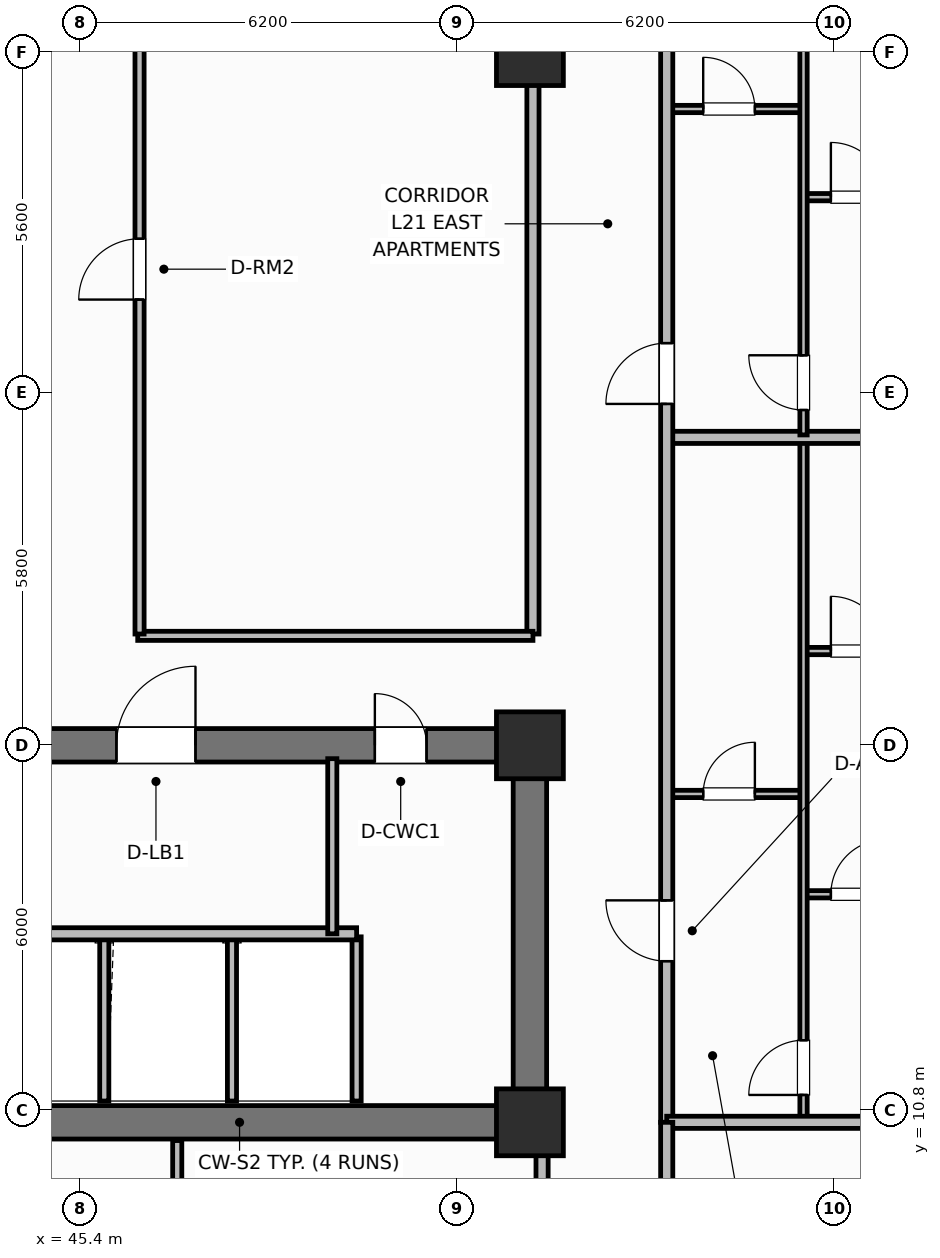
"""IFC4 building model, lengths in metres.
Left out: names, types, materials, properties, quantities, classifications, styles, units other than length and angle.
Written with IfcOpenShell. Run it as: python <this file> out.ifc"""

import sys

from ifc_helpers import new_model, si_unit, direction, frame, frame_2d, origin, origin_2d, place, context, subcontext, project, spatial, rectangle, extrude, element, fill, save


model = new_model("IFC4")
c1 = context("Model", 3, precision=1e-05, world=origin(), true_north=direction((0.0, 1.0)))
c2 = subcontext(c1, "Body", "Model", "MODEL_VIEW")
j1 = project(units=[si_unit("LENGTHUNIT", "METRE"), si_unit("PLANEANGLEUNIT", "RADIAN")], contexts=[c1])
p1 = place(None, origin())
s1 = spatial("IfcSite", under=j1, at=p1, CompositionType="ELEMENT")
p2 = place(p1, origin())
s2 = spatial("IfcBuilding", under=s1, at=p2, CompositionType="ELEMENT")
p3 = place(p2, frame((0.0, 0.0, 88.3)))
s3 = spatial("IfcBuildingStorey", under=s2, at=p3, CompositionType="ELEMENT", Elevation=88.3)
p4 = place(p3, frame((52.8, 10.6, 0.0), z_axis=(0.0, 0.0, 1.0), x_axis=(-1.0, 0.0, 0.0)))
e1 = element("IfcWall", 1, at=p4, inside=s3, PredefinedType="SHEAR", context=c2, shape_type="SweptSolid", body=[
    extrude(rectangle(XDim=27.2, YDim=0.55, at=frame_2d((13.6, 0.0))), origin(), (0.0, 0.0, 1.0), 3.7),
])
p5 = place(p3, frame((52.8, 10.875, 0.0), z_axis=(0.0, 0.0, 1.0), x_axis=(0.0, 1.0, 0.0)))
e2 = element("IfcWall", 2, at=p5, inside=s3, PredefinedType="SHEAR", context=c2, shape_type="SweptSolid", body=[
    extrude(rectangle(XDim=5.65, YDim=0.55, at=frame_2d((2.825, 0.0))), origin(), (0.0, 0.0, 1.0), 3.7),
])
p6 = place(p3, frame((25.6, 16.8, 0.0), z_axis=(0.0, 0.0, 1.0), x_axis=(1.0, 0.0, 0.0)))
e3 = element("IfcWall", 3, at=p6, inside=s3, PredefinedType="SHEAR", context=c2, shape_type="SweptSolid", body=[
    extrude(rectangle(XDim=27.2, YDim=0.55, at=frame_2d((13.6, 0.0))), origin(), (0.0, 0.0, 1.0), 3.7),
])
p7 = place(p6, frame((1.9, 0.0, 0.0)))
e4 = element("IfcOpeningElement", 4, at=p7, cuts=e3, PredefinedType="OPENING", context=c2, shape_type="SweptSolid", body=[
    extrude(rectangle(XDim=1.1, YDim=2.15, at=frame_2d((0.55, 1.075))), frame((0.0, 0.285, 0.0), z_axis=(0.0, -1.0, 0.0), x_axis=(1.0, 0.0, 0.0)), (0.0, 0.0, 1.0), 0.57),
])
p8 = place(p6, frame((13.0, 0.0, 0.0)))
e5 = element("IfcOpeningElement", 5, at=p8, cuts=e3, PredefinedType="OPENING", context=c2, shape_type="SweptSolid", body=[
    extrude(rectangle(XDim=1.2, YDim=2.15, at=frame_2d((0.6, 1.075))), frame((0.0, 0.285, 0.0), z_axis=(0.0, -1.0, 0.0), x_axis=(1.0, 0.0, 0.0)), (0.0, 0.0, 1.0), 0.57),
])
p9 = place(p6, frame((20.4, 0.0, 0.0)))
e6 = element("IfcOpeningElement", 6, at=p9, cuts=e3, PredefinedType="OPENING", context=c2, shape_type="SweptSolid", body=[
    extrude(rectangle(XDim=1.3, YDim=2.2, at=frame_2d((0.65, 1.1))), frame((0.0, 0.285, 0.0), z_axis=(0.0, -1.0, 0.0), x_axis=(1.0, 0.0, 0.0)), (0.0, 0.0, 1.0), 0.57),
])
p10 = place(p6, frame((24.65, 0.0, 0.0)))
e7 = element("IfcOpeningElement", 7, at=p10, cuts=e3, PredefinedType="OPENING", context=c2, shape_type="SweptSolid", body=[
    extrude(rectangle(XDim=0.85, YDim=2.1, at=frame_2d((0.425, 1.05))), frame((0.0, 0.285, 0.0), z_axis=(0.0, -1.0, 0.0), x_axis=(1.0, 0.0, 0.0)), (0.0, 0.0, 1.0), 0.57),
])
for number, where, z_axis, x_axis in (
    (8, (52.8, 10.6, 0.0), (0.0, 0.0, 1.0), (1.0, 0.0, 0.0)),
    (9, (52.8, 16.8, 0.0), (0.0, 0.0, 1.0), (1.0, 0.0, 0.0)),
    (10, (52.8, 28.2, 0.0), (0.0, 0.0, 1.0), (1.0, 0.0, 0.0)),
):
    element("IfcColumn", number, at=place(p3, frame(where, z_axis=z_axis, x_axis=x_axis)), inside=s3, PredefinedType="COLUMN", context=c2, shape_type="SweptSolid", body=[
        extrude(rectangle(XDim=1.1, YDim=1.1, at=origin_2d()), origin(), (0.0, 0.0, 1.0), 3.7),
    ])
for number, where, z_axis, x_axis in (
    (11, (45.8, 10.95, 0.0), (0.0, 0.0, 1.0), (0.0, 1.0, 0.0)),
    (12, (47.9, 10.95, 0.0), (0.0, 0.0, 1.0), (0.0, 1.0, 0.0)),
    (13, (49.95, 10.95, 0.0), (0.0, 0.0, 1.0), (0.0, 1.0, 0.0)),
):
    element("IfcWall", number, at=place(p3, frame(where, z_axis=z_axis, x_axis=x_axis)), inside=s3, PredefinedType="PARTITIONING", context=c2, shape_type="SweptSolid", body=[
        extrude(rectangle(XDim=2.7, YDim=0.15, at=frame_2d((1.35, 0.0))), origin(), (0.0, 0.0, 1.0), 2.53),
    ])
p11 = place(p3, frame((43.55, 13.7, 0.0), z_axis=(0.0, 0.0, 1.0), x_axis=(1.0, 0.0, 0.0)))
e14 = element("IfcWall", 14, at=p11, inside=s3, PredefinedType="PARTITIONING", context=c2, shape_type="SweptSolid", body=[
    extrude(rectangle(XDim=6.4, YDim=0.2, at=frame_2d((3.2, 0.0))), origin(), (0.0, 0.0, 1.0), 2.53),
])
p12 = place(p3, frame((49.55, 13.7, 0.0), z_axis=(0.0, 0.0, 1.0), x_axis=(0.0, 1.0, 0.0)))
e15 = element("IfcWall", 15, at=p12, inside=s3, PredefinedType="PARTITIONING", context=c2, shape_type="SweptSolid", body=[
    extrude(rectangle(XDim=2.88, YDim=0.15, at=frame_2d((1.44, 0.0))), origin(), (0.0, 0.0, 1.0), 2.53),
])
p13 = place(p3, frame((52.85, 18.63, 0.0), z_axis=(0.0, 0.0, 1.0), x_axis=(0.0, 1.0, 0.0)))
e16 = element("IfcWall", 16, at=p13, inside=s3, PredefinedType="PARTITIONING", context=c2, shape_type="SweptSolid", body=[
    extrude(rectangle(XDim=19.14, YDim=0.2, at=frame_2d((9.57, 0.0))), origin(), (0.0, 0.0, 1.0), 2.53),
])
p14 = place(p3, frame((46.35, 18.6, 0.0), z_axis=(0.0, 0.0, 1.0), x_axis=(1.0, 0.0, 0.0)))
e17 = element("IfcWall", 17, at=p14, inside=s3, PredefinedType="PARTITIONING", context=c2, shape_type="SweptSolid", body=[
    extrude(rectangle(XDim=6.5, YDim=0.15, at=frame_2d((3.25, 0.0))), origin(), (0.0, 0.0, 1.0), 2.53),
])
p15 = place(p3, frame((46.38, 18.63, 0.0), z_axis=(0.0, 0.0, 1.0), x_axis=(0.0, 1.0, 0.0)))
e18 = element("IfcWall", 18, at=p15, inside=s3, PredefinedType="PARTITIONING", context=c2, shape_type="SweptSolid", body=[
    extrude(rectangle(XDim=19.14, YDim=0.15, at=frame_2d((9.57, 0.0))), origin(), (0.0, 0.0, 1.0), 2.53),
])
p16 = place(p15, frame((5.5, 0.0, 0.0)))
e19 = element("IfcOpeningElement", 19, at=p16, cuts=e18, PredefinedType="OPENING", context=c2, shape_type="SweptSolid", body=[
    extrude(rectangle(XDim=1.0, YDim=2.15, at=frame_2d((0.5, 1.075))), frame((0.0, 0.085, 0.0), z_axis=(0.0, -1.0, 0.0), x_axis=(1.0, 0.0, 0.0)), (0.0, 0.0, 1.0), 0.17),
])
p17 = place(p3, frame((55.05, 16.0, 0.0), z_axis=(0.0, 0.0, 1.0), x_axis=(1.0, 0.0, 0.0)))
e20 = element("IfcWall", 20, at=p17, inside=s3, PredefinedType="PARTITIONING", context=c2, shape_type="SweptSolid", body=[
    extrude(rectangle(XDim=2.25, YDim=0.12, at=frame_2d((1.125, 0.0))), origin(), (0.0, 0.0, 1.0), 2.53),
])
p18 = place(p17, frame((0.6, 0.0, 0.0)))
e21 = element("IfcOpeningElement", 21, at=p18, cuts=e20, PredefinedType="OPENING", context=c2, shape_type="SweptSolid", body=[
    extrude(rectangle(XDim=0.85, YDim=2.1, at=frame_2d((0.425, 1.05))), frame((0.0, 0.07, 0.0), z_axis=(0.0, -1.0, 0.0), x_axis=(1.0, 0.0, 0.0)), (0.0, 0.0, 1.0), 0.14),
])
p19 = place(p3, frame((57.3, 14.35, 0.0), z_axis=(0.0, 0.0, 1.0), x_axis=(1.0, 0.0, 0.0)))
e22 = element("IfcWall", 22, at=p19, inside=s3, PredefinedType="PARTITIONING", context=c2, shape_type="SweptSolid", body=[
    extrude(rectangle(XDim=6.53, YDim=0.12, at=frame_2d((3.265, 0.0))), origin(), (0.0, 0.0, 1.0), 2.53),
])
p20 = place(p19, frame((0.45, 0.0, 0.0)))
e23 = element("IfcOpeningElement", 23, at=p20, cuts=e22, PredefinedType="OPENING", context=c2, shape_type="SweptSolid", body=[
    extrude(rectangle(XDim=0.9, YDim=2.1, at=frame_2d((0.45, 1.05))), frame((0.0, 0.07, 0.0), z_axis=(0.0, -1.0, 0.0), x_axis=(1.0, 0.0, 0.0)), (0.0, 0.0, 1.0), 0.14),
])
p21 = place(p3, frame((57.3, 18.35, 0.0), z_axis=(0.0, 0.0, 1.0), x_axis=(1.0, 0.0, 0.0)))
e24 = element("IfcWall", 24, at=p21, inside=s3, PredefinedType="PARTITIONING", context=c2, shape_type="SweptSolid", body=[
    extrude(rectangle(XDim=6.53, YDim=0.12, at=frame_2d((3.265, 0.0))), origin(), (0.0, 0.0, 1.0), 2.53),
])
p22 = place(p21, frame((0.45, 0.0, 0.0)))
e25 = element("IfcOpeningElement", 25, at=p22, cuts=e24, PredefinedType="OPENING", context=c2, shape_type="SweptSolid", body=[
    extrude(rectangle(XDim=0.9, YDim=2.1, at=frame_2d((0.45, 1.05))), frame((0.0, 0.07, 0.0), z_axis=(0.0, -1.0, 0.0), x_axis=(1.0, 0.0, 0.0)), (0.0, 0.0, 1.0), 0.14),
])
p23 = place(p3, frame((57.3, 10.64, 0.0), z_axis=(0.0, 0.0, 1.0), x_axis=(0.0, 1.0, 0.0)))
e26 = element("IfcWall", 26, at=p23, inside=s3, PredefinedType="PARTITIONING", context=c2, shape_type="SweptSolid", body=[
    extrude(rectangle(XDim=11.184, YDim=0.12, at=frame_2d((5.592, 0.0))), origin(), (0.0, 0.0, 1.0), 2.53),
])
p24 = place(p23, frame((0.41, 0.0, 0.0)))
e27 = element("IfcOpeningElement", 27, at=p24, cuts=e26, PredefinedType="OPENING", context=c2, shape_type="SweptSolid", body=[
    extrude(rectangle(XDim=0.9, YDim=2.1, at=frame_2d((0.45, 1.05))), frame((0.0, 0.07, 0.0), z_axis=(0.0, -1.0, 0.0), x_axis=(1.0, 0.0, 0.0)), (0.0, 0.0, 1.0), 0.14),
])
p25 = place(p3, frame((55.05, 21.864, 0.0), z_axis=(0.0, 0.0, 1.0), x_axis=(1.0, 0.0, 0.0)))
e28 = element("IfcWall", 28, at=p25, inside=s3, PredefinedType="PARTITIONING", context=c2, shape_type="SweptSolid", body=[
    extrude(rectangle(XDim=8.78, YDim=0.2, at=frame_2d((4.39, 0.0))), origin(), (0.0, 0.0, 1.0), 2.53),
])
p26 = place(p3, frame((55.05, 27.264, 0.0), z_axis=(0.0, 0.0, 1.0), x_axis=(1.0, 0.0, 0.0)))
e29 = element("IfcWall", 29, at=p26, inside=s3, PredefinedType="PARTITIONING", context=c2, shape_type="SweptSolid", body=[
    extrude(rectangle(XDim=2.25, YDim=0.12, at=frame_2d((1.125, 0.0))), origin(), (0.0, 0.0, 1.0), 2.53),
])
p27 = place(p26, frame((0.6, 0.0, 0.0)))
e30 = element("IfcOpeningElement", 30, at=p27, cuts=e29, PredefinedType="OPENING", context=c2, shape_type="SweptSolid", body=[
    extrude(rectangle(XDim=0.85, YDim=2.1, at=frame_2d((0.425, 1.05))), frame((0.0, 0.07, 0.0), z_axis=(0.0, -1.0, 0.0), x_axis=(1.0, 0.0, 0.0)), (0.0, 0.0, 1.0), 0.14),
])
p28 = place(p3, frame((57.3, 25.814, 0.0), z_axis=(0.0, 0.0, 1.0), x_axis=(1.0, 0.0, 0.0)))
e31 = element("IfcWall", 31, at=p28, inside=s3, PredefinedType="PARTITIONING", context=c2, shape_type="SweptSolid", body=[
    extrude(rectangle(XDim=5.981, YDim=0.12, at=frame_2d((2.99, 0.0))), origin(), (0.0, 0.0, 1.0), 2.53),
])
p29 = place(p28, frame((0.45, 0.0, 0.0)))
e32 = element("IfcOpeningElement", 32, at=p29, cuts=e31, PredefinedType="OPENING", context=c2, shape_type="SweptSolid", body=[
    extrude(rectangle(XDim=0.9, YDim=2.1, at=frame_2d((0.45, 1.05))), frame((0.0, 0.07, 0.0), z_axis=(0.0, -1.0, 0.0), x_axis=(1.0, 0.0, 0.0)), (0.0, 0.0, 1.0), 0.14),
])
p30 = place(p3, frame((57.3, 21.904, 0.0), z_axis=(0.0, 0.0, 1.0), x_axis=(0.0, 1.0, 0.0)))
e33 = element("IfcWall", 33, at=p30, inside=s3, PredefinedType="PARTITIONING", context=c2, shape_type="SweptSolid", body=[
    extrude(rectangle(XDim=11.756, YDim=0.12, at=frame_2d((5.878, 0.0))), origin(), (0.0, 0.0, 1.0), 2.53),
])
p31 = place(p30, frame((0.41, 0.0, 0.0)))
e34 = element("IfcOpeningElement", 34, at=p31, cuts=e33, PredefinedType="OPENING", context=c2, shape_type="SweptSolid", body=[
    extrude(rectangle(XDim=0.9, YDim=2.1, at=frame_2d((0.45, 1.05))), frame((0.0, 0.07, 0.0), z_axis=(0.0, -1.0, 0.0), x_axis=(1.0, 0.0, 0.0)), (0.0, 0.0, 1.0), 0.14),
])
p32 = place(p3, frame((55.05, 10.6, 0.0), z_axis=(0.0, 0.0, 1.0), x_axis=(0.0, 1.0, 0.0)))
e35 = element("IfcWall", 35, at=p32, inside=s3, PredefinedType="PARTITIONING", context=c2, shape_type="SweptSolid", body=[
    extrude(rectangle(XDim=35.2, YDim=0.2, at=frame_2d((17.6, 0.0))), origin(), (0.0, 0.0, 1.0), 2.53),
])
p33 = place(p32, frame((2.65, 0.0, 0.0)))
e36 = element("IfcOpeningElement", 36, at=p33, cuts=e35, PredefinedType="OPENING", context=c2, shape_type="SweptSolid", body=[
    extrude(rectangle(XDim=1.0, YDim=2.15, at=frame_2d((0.5, 1.075))), frame((0.0, 0.11, 0.0), z_axis=(0.0, -1.0, 0.0), x_axis=(1.0, 0.0, 0.0)), (0.0, 0.0, 1.0), 0.22),
])
p34 = place(p32, frame((11.814, 0.0, 0.0)))
e37 = element("IfcOpeningElement", 37, at=p34, cuts=e35, PredefinedType="OPENING", context=c2, shape_type="SweptSolid", body=[
    extrude(rectangle(XDim=1.0, YDim=2.15, at=frame_2d((0.5, 1.075))), frame((0.0, 0.11, 0.0), z_axis=(0.0, -1.0, 0.0), x_axis=(1.0, 0.0, 0.0)), (0.0, 0.0, 1.0), 0.22),
])
p35 = place(p32, frame((23.65, 0.0, 0.0)))
e38 = element("IfcOpeningElement", 38, at=p35, cuts=e35, PredefinedType="OPENING", context=c2, shape_type="SweptSolid", body=[
    extrude(rectangle(XDim=1.0, YDim=2.15, at=frame_2d((0.5, 1.075))), frame((0.0, 0.11, 0.0), z_axis=(0.0, -1.0, 0.0), x_axis=(1.0, 0.0, 0.0)), (0.0, 0.0, 1.0), 0.22),
])
p36 = place(p3, frame((55.05, 10.6, 0.0), z_axis=(0.0, 0.0, 1.0), x_axis=(1.0, 0.0, 0.0)))
e39 = element("IfcWall", 39, at=p36, inside=s3, PredefinedType="PARTITIONING", context=c2, shape_type="SweptSolid", body=[
    extrude(rectangle(XDim=8.36, YDim=0.2, at=frame_2d((4.18, 0.0))), origin(), (0.0, 0.0, 1.0), 2.53),
])
p37 = place(p3, frame((55.05, 4.97, 0.0), z_axis=(0.0, 0.0, 1.0), x_axis=(0.0, 1.0, 0.0)))
e40 = element("IfcWall", 40, at=p37, inside=s3, PredefinedType="PARTITIONING", context=c2, shape_type="SweptSolid", body=[
    extrude(rectangle(XDim=5.63, YDim=0.2, at=frame_2d((2.815, 0.0))), origin(), (0.0, 0.0, 1.0), 2.53),
])
p38 = place(p3, frame((47.0, 4.97, 0.0), z_axis=(0.0, 0.0, 1.0), x_axis=(0.0, 1.0, 0.0)))
e41 = element("IfcWall", 41, at=p38, inside=s3, PredefinedType="PARTITIONING", context=c2, shape_type="SweptSolid", body=[
    extrude(rectangle(XDim=5.33, YDim=0.15, at=frame_2d((2.665, 0.0))), origin(), (0.0, 0.0, 1.0), 2.53),
])
p39 = place(p38, frame((1.3, 0.0, 0.0)))
e42 = element("IfcOpeningElement", 42, at=p39, cuts=e41, PredefinedType="OPENING", context=c2, shape_type="SweptSolid", body=[
    extrude(rectangle(XDim=0.9, YDim=2.1, at=frame_2d((0.45, 1.05))), frame((0.0, 0.085, 0.0), z_axis=(0.0, -1.0, 0.0), x_axis=(1.0, 0.0, 0.0)), (0.0, 0.0, 1.0), 0.17),
])
p40 = place(p3, frame((53.0, 5.62, 0.0), z_axis=(0.0, 0.0, 1.0), x_axis=(0.0, 1.0, 0.0)))
e43 = element("IfcWall", 43, at=p40, inside=s3, PredefinedType="PARTITIONING", context=c2, shape_type="SweptSolid", body=[
    extrude(rectangle(XDim=4.68, YDim=0.2, at=frame_2d((2.34, 0.0))), origin(), (0.0, 0.0, 1.0), 2.53),
])
p41 = place(p40, frame((1.3, 0.0, 0.0)))
e44 = element("IfcOpeningElement", 44, at=p41, cuts=e43, PredefinedType="OPENING", context=c2, shape_type="SweptSolid", body=[
    extrude(rectangle(XDim=0.9, YDim=2.1, at=frame_2d((0.45, 1.05))), frame((0.0, 0.11, 0.0), z_axis=(0.0, -1.0, 0.0), x_axis=(1.0, 0.0, 0.0)), (0.0, 0.0, 1.0), 0.22),
])
p42 = place(p16, origin())
e45 = element("IfcDoor", 45, at=p42, inside=s3, OperationType="SINGLE_SWING_LEFT", PredefinedType="DOOR", context=c2, shape_type="SweptSolid", body=[
    extrude(rectangle(XDim=1.0, YDim=2.15, at=frame_2d((0.5, 1.075))), frame((0.0, 0.025, 0.0), z_axis=(0.0, -1.0, 0.0), x_axis=(1.0, 0.0, 0.0)), (0.0, 0.0, 1.0), 0.05),
])
fill(e19, e45)
p43 = place(p18, origin())
e46 = element("IfcDoor", 46, at=p43, inside=s3, OperationType="SINGLE_SWING_RIGHT", PredefinedType="DOOR", context=c2, shape_type="SweptSolid", body=[
    extrude(rectangle(XDim=0.85, YDim=2.1, at=frame_2d((0.425, 1.05))), frame((0.0, 0.025, 0.0), z_axis=(0.0, -1.0, 0.0), x_axis=(1.0, 0.0, 0.0)), (0.0, 0.0, 1.0), 0.05),
])
fill(e21, e46)
p44 = place(p20, origin())
e47 = element("IfcDoor", 47, at=p44, inside=s3, OperationType="SINGLE_SWING_RIGHT", PredefinedType="DOOR", context=c2, shape_type="SweptSolid", body=[
    extrude(rectangle(XDim=0.9, YDim=2.1, at=frame_2d((0.45, 1.05))), frame((0.0, 0.025, 0.0), z_axis=(0.0, -1.0, 0.0), x_axis=(1.0, 0.0, 0.0)), (0.0, 0.0, 1.0), 0.05),
])
fill(e23, e47)
p45 = place(p22, origin())
e48 = element("IfcDoor", 48, at=p45, inside=s3, OperationType="SINGLE_SWING_LEFT", PredefinedType="DOOR", context=c2, shape_type="SweptSolid", body=[
    extrude(rectangle(XDim=0.9, YDim=2.1, at=frame_2d((0.45, 1.05))), frame((0.0, 0.025, 0.0), z_axis=(0.0, -1.0, 0.0), x_axis=(1.0, 0.0, 0.0)), (0.0, 0.0, 1.0), 0.05),
])
fill(e25, e48)
p46 = place(p24, origin())
e49 = element("IfcDoor", 49, at=p46, inside=s3, OperationType="SINGLE_SWING_LEFT", PredefinedType="DOOR", context=c2, shape_type="SweptSolid", body=[
    extrude(rectangle(XDim=0.9, YDim=2.1, at=frame_2d((0.45, 1.05))), frame((0.0, 0.025, 0.0), z_axis=(0.0, -1.0, 0.0), x_axis=(1.0, 0.0, 0.0)), (0.0, 0.0, 1.0), 0.05),
])
fill(e27, e49)
p47 = place(p27, origin())
e50 = element("IfcDoor", 50, at=p47, inside=s3, OperationType="SINGLE_SWING_LEFT", PredefinedType="DOOR", context=c2, shape_type="SweptSolid", body=[
    extrude(rectangle(XDim=0.85, YDim=2.1, at=frame_2d((0.425, 1.05))), frame((0.0, 0.025, 0.0), z_axis=(0.0, -1.0, 0.0), x_axis=(1.0, 0.0, 0.0)), (0.0, 0.0, 1.0), 0.05),
])
fill(e30, e50)
p48 = place(p29, origin())
e51 = element("IfcDoor", 51, at=p48, inside=s3, OperationType="SINGLE_SWING_LEFT", PredefinedType="DOOR", context=c2, shape_type="SweptSolid", body=[
    extrude(rectangle(XDim=0.9, YDim=2.1, at=frame_2d((0.45, 1.05))), frame((0.0, 0.025, 0.0), z_axis=(0.0, -1.0, 0.0), x_axis=(1.0, 0.0, 0.0)), (0.0, 0.0, 1.0), 0.05),
])
fill(e32, e51)
p49 = place(p31, origin())
e52 = element("IfcDoor", 52, at=p49, inside=s3, OperationType="SINGLE_SWING_RIGHT", PredefinedType="DOOR", context=c2, shape_type="SweptSolid", body=[
    extrude(rectangle(XDim=0.9, YDim=2.1, at=frame_2d((0.45, 1.05))), frame((0.0, 0.025, 0.0), z_axis=(0.0, -1.0, 0.0), x_axis=(1.0, 0.0, 0.0)), (0.0, 0.0, 1.0), 0.05),
])
fill(e34, e52)
p50 = place(p33, origin())
e53 = element("IfcDoor", 53, at=p50, inside=s3, OperationType="SINGLE_SWING_RIGHT", PredefinedType="DOOR", context=c2, shape_type="SweptSolid", body=[
    extrude(rectangle(XDim=1.0, YDim=2.15, at=frame_2d((0.5, 1.075))), frame((0.0, 0.025, 0.0), z_axis=(0.0, -1.0, 0.0), x_axis=(1.0, 0.0, 0.0)), (0.0, 0.0, 1.0), 0.05),
])
fill(e36, e53)
p51 = place(p34, origin())
e54 = element("IfcDoor", 54, at=p51, inside=s3, OperationType="SINGLE_SWING_LEFT", PredefinedType="DOOR", context=c2, shape_type="SweptSolid", body=[
    extrude(rectangle(XDim=1.0, YDim=2.15, at=frame_2d((0.5, 1.075))), frame((0.0, 0.025, 0.0), z_axis=(0.0, -1.0, 0.0), x_axis=(1.0, 0.0, 0.0)), (0.0, 0.0, 1.0), 0.05),
])
fill(e37, e54)
p52 = place(p9, origin())
e55 = element("IfcDoor", 55, at=p52, inside=s3, OperationType="SINGLE_SWING_RIGHT", PredefinedType="DOOR", context=c2, shape_type="SweptSolid", body=[
    extrude(rectangle(XDim=1.3, YDim=2.2, at=frame_2d((0.65, 1.1))), frame((0.0, 0.025, 0.0), z_axis=(0.0, -1.0, 0.0), x_axis=(1.0, 0.0, 0.0)), (0.0, 0.0, 1.0), 0.05),
])
fill(e6, e55)
p53 = place(p10, origin())
e56 = element("IfcDoor", 56, at=p53, inside=s3, OperationType="SINGLE_SWING_LEFT", PredefinedType="DOOR", context=c2, shape_type="SweptSolid", body=[
    extrude(rectangle(XDim=0.85, YDim=2.1, at=frame_2d((0.425, 1.05))), frame((0.0, 0.025, 0.0), z_axis=(0.0, -1.0, 0.0), x_axis=(1.0, 0.0, 0.0)), (0.0, 0.0, 1.0), 0.05),
])
fill(e7, e56)
save(model, sys.argv[1])
